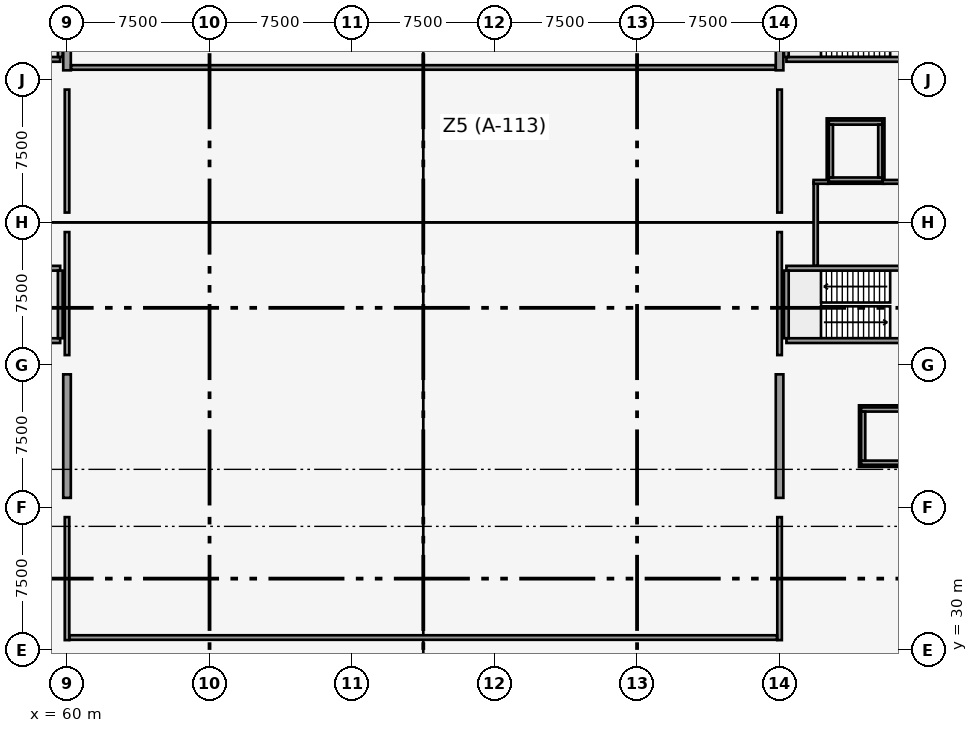
"""IFC4 building model, lengths in metres.
Left out: names, types, materials, properties, quantities, classifications, styles, units other than length and angle.
Written with IfcOpenShell. Run it as: python <this file> out.ifc"""

import sys

from ifc_helpers import new_model, si_unit, direction, frame, frame_2d, origin, origin_2d, place, context, subcontext, project, spatial, rectangle, extrude, element, fill, save


model = new_model("IFC4")
c1 = context("Model", 3, precision=1e-05, world=origin(), true_north=direction((0.0, 1.0)))
c2 = subcontext(c1, "Body", "Model", "MODEL_VIEW")
j1 = project(units=[si_unit("LENGTHUNIT", "METRE"), si_unit("PLANEANGLEUNIT", "RADIAN")], contexts=[c1])
p1 = place(None, origin())
s1 = spatial("IfcSite", under=j1, at=p1, CompositionType="ELEMENT")
p2 = place(p1, origin())
s2 = spatial("IfcBuilding", under=s1, at=p2, CompositionType="ELEMENT")
p3 = place(p2, frame((0.0, 0.0, -4.8)))
s3 = spatial("IfcBuildingStorey", under=s2, at=p3, CompositionType="ELEMENT", Elevation=-4.8)
for number, where, z_axis, x_axis in (
    (1, (60.0, 30.0, 0.0), (0.0, 0.0, 1.0), (1.0, 0.0, 0.0)),
    (2, (60.0, 37.5, 0.0), (0.0, 0.0, 1.0), (1.0, 0.0, 0.0)),
    (3, (60.0, 45.0, 0.0), (0.0, 0.0, 1.0), (1.0, 0.0, 0.0)),
    (4, (60.0, 52.5, 0.0), (0.0, 0.0, 1.0), (1.0, 0.0, 0.0)),
    (5, (60.0, 60.0, 0.0), (0.0, 0.0, 1.0), (1.0, 0.0, 0.0)),
):
    element("IfcColumn", number, at=place(p3, frame(where, z_axis=z_axis, x_axis=x_axis)), inside=s3, PredefinedType="COLUMN", context=c2, shape_type="SweptSolid", body=[
        extrude(rectangle(XDim=1.0, YDim=1.0, at=origin_2d()), origin(), (0.0, 0.0, 1.0), 4.8),
    ])
for number, where, z_axis, x_axis in (
    (6, (67.5, 30.0, 0.0), (0.0, 0.0, 1.0), (1.0, 0.0, 0.0)),
    (7, (75.0, 30.0, 0.0), (0.0, 0.0, 1.0), (1.0, 0.0, 0.0)),
    (8, (75.0, 37.5, 0.0), (0.0, 0.0, 1.0), (1.0, 0.0, 0.0)),
    (9, (75.0, 45.0, 0.0), (0.0, 0.0, 1.0), (1.0, 0.0, 0.0)),
    (10, (75.0, 52.5, 0.0), (0.0, 0.0, 1.0), (1.0, 0.0, 0.0)),
    (11, (75.0, 60.0, 0.0), (0.0, 0.0, 1.0), (1.0, 0.0, 0.0)),
    (12, (82.5, 30.0, 0.0), (0.0, 0.0, 1.0), (1.0, 0.0, 0.0)),
    (13, (90.0, 30.0, 0.0), (0.0, 0.0, 1.0), (1.0, 0.0, 0.0)),
    (14, (90.0, 37.5, 0.0), (0.0, 0.0, 1.0), (1.0, 0.0, 0.0)),
    (15, (90.0, 45.0, 0.0), (0.0, 0.0, 1.0), (1.0, 0.0, 0.0)),
    (16, (90.0, 52.5, 0.0), (0.0, 0.0, 1.0), (1.0, 0.0, 0.0)),
    (17, (90.0, 60.0, 0.0), (0.0, 0.0, 1.0), (1.0, 0.0, 0.0)),
):
    element("IfcColumn", number, at=place(p3, frame(where, z_axis=z_axis, x_axis=x_axis)), inside=s3, PredefinedType="COLUMN", context=c2, shape_type="SweptSolid", body=[
        extrude(rectangle(XDim=0.9, YDim=0.9, at=origin_2d()), origin(), (0.0, 0.0, 1.0), 4.8),
    ])
for number, where, z_axis, x_axis in (
    (18, (97.5, 30.0, 0.0), (0.0, 0.0, 1.0), (1.0, 0.0, 0.0)),
    (19, (97.5, 37.5, 0.0), (0.0, 0.0, 1.0), (1.0, 0.0, 0.0)),
    (20, (97.5, 45.0, 0.0), (0.0, 0.0, 1.0), (1.0, 0.0, 0.0)),
    (21, (97.5, 52.5, 0.0), (0.0, 0.0, 1.0), (1.0, 0.0, 0.0)),
    (22, (97.5, 60.0, 0.0), (0.0, 0.0, 1.0), (1.0, 0.0, 0.0)),
):
    element("IfcColumn", number, at=place(p3, frame(where, z_axis=z_axis, x_axis=x_axis)), inside=s3, PredefinedType="COLUMN", context=c2, shape_type="SweptSolid", body=[
        extrude(rectangle(XDim=1.0, YDim=1.0, at=origin_2d()), origin(), (0.0, 0.0, 1.0), 4.8),
    ])
for number, where, z_axis, x_axis in (
    (23, (60.0, 38.0, 0.0), (0.0, 0.0, 1.0), (0.0, 1.0, 0.0)),
    (24, (60.0, 60.5, 0.0), (0.0, 0.0, 1.0), (0.0, 1.0, 0.0)),
):
    element("IfcWall", number, at=place(p3, frame(where, z_axis=z_axis, x_axis=x_axis)), inside=s3, PredefinedType="SHEAR", context=c2, shape_type="SweptSolid", body=[
        extrude(rectangle(XDim=6.5, YDim=0.4, at=frame_2d((3.25, 0.0))), origin(), (0.0, 0.0, 1.0), 2.7),
    ])
for number, where, z_axis, x_axis in (
    (25, (97.5, 38.0, 0.0), (0.0, 0.0, 1.0), (0.0, 1.0, 0.0)),
    (26, (97.5, 60.5, 0.0), (0.0, 0.0, 1.0), (0.0, 1.0, 0.0)),
):
    element("IfcWall", number, at=place(p3, frame(where, z_axis=z_axis, x_axis=x_axis)), inside=s3, PredefinedType="SHEAR", context=c2, shape_type="SweptSolid", body=[
        extrude(rectangle(XDim=6.5, YDim=0.4, at=frame_2d((3.25, 0.0))), origin(), (0.0, 0.0, 1.0), 3.55),
    ])
p4 = place(p3, frame((52.38, 46.275, 0.0), z_axis=(0.0, 0.0, 1.0), x_axis=(1.0, 0.0, 0.0)))
e27 = element("IfcWall", 27, at=p4, inside=s3, PredefinedType="SOLIDWALL", context=c2, shape_type="SweptSolid", body=[
    extrude(rectangle(XDim=7.26, YDim=0.25, at=frame_2d((3.63, 0.0))), origin(), (0.0, 0.0, 1.0), 4.5),
])
p5 = place(p4, frame((0.62, 0.0, 0.0)))
e28 = element("IfcOpeningElement", 28, at=p5, cuts=e27, PredefinedType="OPENING", context=c2, shape_type="SweptSolid", body=[
    extrude(rectangle(XDim=1.1, YDim=2.15, at=frame_2d((0.55, 1.075))), frame((0.0, 0.135, 0.0), z_axis=(0.0, -1.0, 0.0), x_axis=(1.0, 0.0, 0.0)), (0.0, 0.0, 1.0), 0.27),
])
p6 = place(p3, frame((52.38, 50.085, 0.0), z_axis=(0.0, 0.0, 1.0), x_axis=(1.0, 0.0, 0.0)))
e29 = element("IfcWall", 29, at=p6, inside=s3, PredefinedType="SOLIDWALL", context=c2, shape_type="SweptSolid", body=[
    extrude(rectangle(XDim=7.26, YDim=0.25, at=frame_2d((3.63, 0.0))), origin(), (0.0, 0.0, 1.0), 4.5),
])
p7 = place(p6, frame((0.62, 0.0, 0.0)))
e30 = element("IfcOpeningElement", 30, at=p7, cuts=e29, PredefinedType="OPENING", context=c2, shape_type="SweptSolid", body=[
    extrude(rectangle(XDim=1.1, YDim=2.15, at=frame_2d((0.55, 1.075))), frame((0.0, 0.135, 0.0), z_axis=(0.0, -1.0, 0.0), x_axis=(1.0, 0.0, 0.0)), (0.0, 0.0, 1.0), 0.27),
])
p8 = place(p3, frame((59.645, 46.4, 0.0), z_axis=(0.0, 0.0, 1.0), x_axis=(0.0, 1.0, 0.0)))
e31 = element("IfcWall", 31, at=p8, inside=s3, PredefinedType="SOLIDWALL", context=c2, shape_type="SweptSolid", body=[
    extrude(rectangle(XDim=3.56, YDim=0.25, at=frame_2d((1.78, 0.0))), origin(), (0.0, 0.0, 1.0), 4.5),
])
p9 = place(p3, frame((97.86, 46.275, 0.0), z_axis=(0.0, 0.0, 1.0), x_axis=(1.0, 0.0, 0.0)))
e32 = element("IfcWall", 32, at=p9, inside=s3, PredefinedType="SOLIDWALL", context=c2, shape_type="SweptSolid", body=[
    extrude(rectangle(XDim=7.26, YDim=0.25, at=frame_2d((3.63, 0.0))), origin(), (0.0, 0.0, 1.0), 4.5),
])
p10 = place(p9, frame((5.54, 0.0, 0.0)))
e33 = element("IfcOpeningElement", 33, at=p10, cuts=e32, PredefinedType="OPENING", context=c2, shape_type="SweptSolid", body=[
    extrude(rectangle(XDim=1.1, YDim=2.15, at=frame_2d((0.55, 1.075))), frame((0.0, 0.135, 0.0), z_axis=(0.0, -1.0, 0.0), x_axis=(1.0, 0.0, 0.0)), (0.0, 0.0, 1.0), 0.27),
])
p11 = place(p3, frame((97.86, 50.085, 0.0), z_axis=(0.0, 0.0, 1.0), x_axis=(1.0, 0.0, 0.0)))
e34 = element("IfcWall", 34, at=p11, inside=s3, PredefinedType="SOLIDWALL", context=c2, shape_type="SweptSolid", body=[
    extrude(rectangle(XDim=7.26, YDim=0.25, at=frame_2d((3.63, 0.0))), origin(), (0.0, 0.0, 1.0), 4.5),
])
p12 = place(p11, frame((5.54, 0.0, 0.0)))
e35 = element("IfcOpeningElement", 35, at=p12, cuts=e34, PredefinedType="OPENING", context=c2, shape_type="SweptSolid", body=[
    extrude(rectangle(XDim=1.1, YDim=2.15, at=frame_2d((0.55, 1.075))), frame((0.0, 0.135, 0.0), z_axis=(0.0, -1.0, 0.0), x_axis=(1.0, 0.0, 0.0)), (0.0, 0.0, 1.0), 0.27),
])
p13 = place(p3, frame((97.855, 46.4, 0.0), z_axis=(0.0, 0.0, 1.0), x_axis=(0.0, 1.0, 0.0)))
e36 = element("IfcWall", 36, at=p13, inside=s3, PredefinedType="SOLIDWALL", context=c2, shape_type="SweptSolid", body=[
    extrude(rectangle(XDim=3.56, YDim=0.25, at=frame_2d((1.78, 0.0))), origin(), (0.0, 0.0, 1.0), 4.5),
])
p14 = place(p3, frame((52.38, 61.075, 0.0), z_axis=(0.0, 0.0, 1.0), x_axis=(1.0, 0.0, 0.0)))
e37 = element("IfcWall", 37, at=p14, inside=s3, PredefinedType="SOLIDWALL", context=c2, shape_type="SweptSolid", body=[
    extrude(rectangle(XDim=7.26, YDim=0.25, at=frame_2d((3.63, 0.0))), origin(), (0.0, 0.0, 1.0), 4.5),
])
p15 = place(p14, frame((0.62, 0.0, 0.0)))
e38 = element("IfcOpeningElement", 38, at=p15, cuts=e37, PredefinedType="OPENING", context=c2, shape_type="SweptSolid", body=[
    extrude(rectangle(XDim=1.1, YDim=2.15, at=frame_2d((0.55, 1.075))), frame((0.0, 0.135, 0.0), z_axis=(0.0, -1.0, 0.0), x_axis=(1.0, 0.0, 0.0)), (0.0, 0.0, 1.0), 0.27),
])
p16 = place(p3, frame((59.645, 61.2, 0.0), z_axis=(0.0, 0.0, 1.0), x_axis=(0.0, 1.0, 0.0)))
e39 = element("IfcWall", 39, at=p16, inside=s3, PredefinedType="SOLIDWALL", context=c2, shape_type="SweptSolid", body=[
    extrude(rectangle(XDim=3.56, YDim=0.25, at=frame_2d((1.78, 0.0))), origin(), (0.0, 0.0, 1.0), 4.5),
])
p17 = place(p3, frame((97.86, 61.075, 0.0), z_axis=(0.0, 0.0, 1.0), x_axis=(1.0, 0.0, 0.0)))
e40 = element("IfcWall", 40, at=p17, inside=s3, PredefinedType="SOLIDWALL", context=c2, shape_type="SweptSolid", body=[
    extrude(rectangle(XDim=7.26, YDim=0.25, at=frame_2d((3.63, 0.0))), origin(), (0.0, 0.0, 1.0), 4.5),
])
p18 = place(p17, frame((5.54, 0.0, 0.0)))
e41 = element("IfcOpeningElement", 41, at=p18, cuts=e40, PredefinedType="OPENING", context=c2, shape_type="SweptSolid", body=[
    extrude(rectangle(XDim=1.1, YDim=2.15, at=frame_2d((0.55, 1.075))), frame((0.0, 0.135, 0.0), z_axis=(0.0, -1.0, 0.0), x_axis=(1.0, 0.0, 0.0)), (0.0, 0.0, 1.0), 0.27),
])
p19 = place(p3, frame((97.855, 61.2, 0.0), z_axis=(0.0, 0.0, 1.0), x_axis=(0.0, 1.0, 0.0)))
e42 = element("IfcWall", 42, at=p19, inside=s3, PredefinedType="SOLIDWALL", context=c2, shape_type="SweptSolid", body=[
    extrude(rectangle(XDim=3.56, YDim=0.25, at=frame_2d((1.78, 0.0))), origin(), (0.0, 0.0, 1.0), 4.5),
])
for number, where, z_axis, x_axis in (
    (43, (101.79, 39.85, 0.0), (0.0, 0.0, 1.0), (1.0, 0.0, 0.0)),
    (44, (101.79, 42.65, 0.0), (0.0, 0.0, 1.0), (1.0, 0.0, 0.0)),
):
    element("IfcWall", number, at=place(p3, frame(where, z_axis=z_axis, x_axis=x_axis)), inside=s3, PredefinedType="SOLIDWALL", context=c2, shape_type="SweptSolid", body=[
        extrude(rectangle(XDim=2.62, YDim=0.22, at=frame_2d((1.31, 0.0))), origin(), (0.0, 0.0, 1.0), 4.5),
    ])
p20 = place(p3, frame((101.9, 39.96, 0.0), z_axis=(0.0, 0.0, 1.0), x_axis=(0.0, 1.0, 0.0)))
e45 = element("IfcWall", 45, at=p20, inside=s3, PredefinedType="SOLIDWALL", context=c2, shape_type="SweptSolid", body=[
    extrude(rectangle(XDim=2.58, YDim=0.22, at=frame_2d((1.29, 0.0))), origin(), (0.0, 0.0, 1.0), 4.5),
])
p21 = place(p20, frame((0.79, 0.0, 0.0)))
e46 = element("IfcOpeningElement", 46, at=p21, cuts=e45, PredefinedType="OPENING", context=c2, shape_type="SweptSolid", body=[
    extrude(rectangle(XDim=1.0, YDim=2.15, at=frame_2d((0.5, 1.075))), frame((0.0, 0.12, 0.0), z_axis=(0.0, -1.0, 0.0), x_axis=(1.0, 0.0, 0.0)), (0.0, 0.0, 1.0), 0.24),
])
p22 = place(p3, frame((100.09, 54.75, 0.0), z_axis=(0.0, 0.0, 1.0), x_axis=(1.0, 0.0, 0.0)))
e47 = element("IfcWall", 47, at=p22, inside=s3, PredefinedType="SOLIDWALL", context=c2, shape_type="SweptSolid", body=[
    extrude(rectangle(XDim=2.82, YDim=0.22, at=frame_2d((1.41, 0.0))), origin(), (0.0, 0.0, 1.0), 4.5),
])
p23 = place(p22, frame((0.86, 0.0, 0.0)))
e48 = element("IfcOpeningElement", 48, at=p23, cuts=e47, PredefinedType="OPENING", context=c2, shape_type="SweptSolid", body=[
    extrude(rectangle(XDim=1.1, YDim=2.15, at=frame_2d((0.55, 1.075))), frame((0.0, 0.12, 0.0), z_axis=(0.0, -1.0, 0.0), x_axis=(1.0, 0.0, 0.0)), (0.0, 0.0, 1.0), 0.24),
])
p24 = place(p3, frame((100.09, 57.75, 0.0), z_axis=(0.0, 0.0, 1.0), x_axis=(1.0, 0.0, 0.0)))
e49 = element("IfcWall", 49, at=p24, inside=s3, PredefinedType="SOLIDWALL", context=c2, shape_type="SweptSolid", body=[
    extrude(rectangle(XDim=2.82, YDim=0.22, at=frame_2d((1.41, 0.0))), origin(), (0.0, 0.0, 1.0), 4.5),
])
for number, where, z_axis, x_axis in (
    (50, (100.2, 54.86, 0.0), (0.0, 0.0, 1.0), (0.0, 1.0, 0.0)),
    (51, (102.8, 54.86, 0.0), (0.0, 0.0, 1.0), (0.0, 1.0, 0.0)),
):
    element("IfcWall", number, at=place(p3, frame(where, z_axis=z_axis, x_axis=x_axis)), inside=s3, PredefinedType="SOLIDWALL", context=c2, shape_type="SweptSolid", body=[
        extrude(rectangle(XDim=2.78, YDim=0.22, at=frame_2d((1.39, 0.0))), origin(), (0.0, 0.0, 1.0), 4.5),
    ])
p25 = place(p3, frame((99.4, 50.22, 0.0), z_axis=(0.0, 0.0, 1.0), x_axis=(0.0, 1.0, 0.0)))
e52 = element("IfcWall", 52, at=p25, inside=s3, PredefinedType="SOLIDWALL", context=c2, shape_type="SweptSolid", body=[
    extrude(rectangle(XDim=4.41, YDim=0.22, at=frame_2d((2.205, 0.0))), origin(), (0.0, 0.0, 1.0), 4.5),
])
p26 = place(p25, frame((0.45, 0.0, 0.0)))
e53 = element("IfcOpeningElement", 53, at=p26, cuts=e52, PredefinedType="OPENING", context=c2, shape_type="SweptSolid", body=[
    extrude(rectangle(XDim=1.1, YDim=2.15, at=frame_2d((0.55, 1.075))), frame((0.0, 0.12, 0.0), z_axis=(0.0, -1.0, 0.0), x_axis=(1.0, 0.0, 0.0)), (0.0, 0.0, 1.0), 0.24),
])
p27 = place(p3, frame((99.29, 54.63, 0.0), z_axis=(0.0, 0.0, 1.0), x_axis=(1.0, 0.0, 0.0)))
e54 = element("IfcWall", 54, at=p27, inside=s3, PredefinedType="PARTITIONING", context=c2, shape_type="SweptSolid", body=[
    extrude(rectangle(XDim=0.785, YDim=0.2, at=frame_2d((0.393, 0.0))), origin(), (0.0, 0.0, 1.0), 4.48),
])
p28 = place(p3, frame((102.925, 54.63, 0.0), z_axis=(0.0, 0.0, 1.0), x_axis=(1.0, 0.0, 0.0)))
e55 = element("IfcWall", 55, at=p28, inside=s3, PredefinedType="PARTITIONING", context=c2, shape_type="SweptSolid", body=[
    extrude(rectangle(XDim=1.935, YDim=0.2, at=frame_2d((0.968, 0.0))), origin(), (0.0, 0.0, 1.0), 4.48),
])
p29 = place(p3, frame((60.0, 30.514, 0.0), z_axis=(0.0, 0.0, 1.0), x_axis=(0.0, 1.0, 0.0)))
e56 = element("IfcWall", 56, at=p29, inside=s3, PredefinedType="PARTITIONING", context=c2, shape_type="SweptSolid", body=[
    extrude(rectangle(XDim=6.472, YDim=0.24, at=frame_2d((3.236, 0.0))), origin(), (0.0, 0.0, 1.0), 2.67),
])
p30 = place(p29, frame((2.436, 0.0, 0.0)))
e57 = element("IfcOpeningElement", 57, at=p30, cuts=e56, PredefinedType="OPENING", context=c2, shape_type="SweptSolid", body=[
    extrude(rectangle(XDim=1.6, YDim=2.15, at=frame_2d((0.8, 1.075))), frame((0.0, 0.13, 0.0), z_axis=(0.0, -1.0, 0.0), x_axis=(1.0, 0.0, 0.0)), (0.0, 0.0, 1.0), 0.26),
])
p31 = place(p3, frame((60.0, 45.514, 0.0), z_axis=(0.0, 0.0, 1.0), x_axis=(0.0, 1.0, 0.0)))
e58 = element("IfcWall", 58, at=p31, inside=s3, PredefinedType="PARTITIONING", context=c2, shape_type="SweptSolid", body=[
    extrude(rectangle(XDim=6.472, YDim=0.24, at=frame_2d((3.236, 0.0))), origin(), (0.0, 0.0, 1.0), 2.67),
])
p32 = place(p3, frame((60.0, 53.014, 0.0), z_axis=(0.0, 0.0, 1.0), x_axis=(0.0, 1.0, 0.0)))
e59 = element("IfcWall", 59, at=p32, inside=s3, PredefinedType="PARTITIONING", context=c2, shape_type="SweptSolid", body=[
    extrude(rectangle(XDim=6.472, YDim=0.24, at=frame_2d((3.236, 0.0))), origin(), (0.0, 0.0, 1.0), 2.67),
])
p33 = place(p32, frame((2.436, 0.0, 0.0)))
e60 = element("IfcOpeningElement", 60, at=p33, cuts=e59, PredefinedType="OPENING", context=c2, shape_type="SweptSolid", body=[
    extrude(rectangle(XDim=1.6, YDim=2.15, at=frame_2d((0.8, 1.075))), frame((0.0, 0.13, 0.0), z_axis=(0.0, -1.0, 0.0), x_axis=(1.0, 0.0, 0.0)), (0.0, 0.0, 1.0), 0.26),
])
p34 = place(p3, frame((97.5, 30.514, 0.0), z_axis=(0.0, 0.0, 1.0), x_axis=(0.0, 1.0, 0.0)))
e61 = element("IfcWall", 61, at=p34, inside=s3, PredefinedType="PARTITIONING", context=c2, shape_type="SweptSolid", body=[
    extrude(rectangle(XDim=6.472, YDim=0.24, at=frame_2d((3.236, 0.0))), origin(), (0.0, 0.0, 1.0), 3.52),
])
p35 = place(p34, frame((2.436, 0.0, 0.0)))
e62 = element("IfcOpeningElement", 62, at=p35, cuts=e61, PredefinedType="OPENING", context=c2, shape_type="SweptSolid", body=[
    extrude(rectangle(XDim=1.6, YDim=2.15, at=frame_2d((0.8, 1.075))), frame((0.0, 0.13, 0.0), z_axis=(0.0, -1.0, 0.0), x_axis=(1.0, 0.0, 0.0)), (0.0, 0.0, 1.0), 0.26),
])
p36 = place(p3, frame((97.5, 45.514, 0.0), z_axis=(0.0, 0.0, 1.0), x_axis=(0.0, 1.0, 0.0)))
e63 = element("IfcWall", 63, at=p36, inside=s3, PredefinedType="PARTITIONING", context=c2, shape_type="SweptSolid", body=[
    extrude(rectangle(XDim=6.472, YDim=0.24, at=frame_2d((3.236, 0.0))), origin(), (0.0, 0.0, 1.0), 3.52),
])
p37 = place(p3, frame((97.5, 53.014, 0.0), z_axis=(0.0, 0.0, 1.0), x_axis=(0.0, 1.0, 0.0)))
e64 = element("IfcWall", 64, at=p37, inside=s3, PredefinedType="PARTITIONING", context=c2, shape_type="SweptSolid", body=[
    extrude(rectangle(XDim=6.472, YDim=0.24, at=frame_2d((3.236, 0.0))), origin(), (0.0, 0.0, 1.0), 3.52),
])
p38 = place(p37, frame((2.436, 0.0, 0.0)))
e65 = element("IfcOpeningElement", 65, at=p38, cuts=e64, PredefinedType="OPENING", context=c2, shape_type="SweptSolid", body=[
    extrude(rectangle(XDim=1.6, YDim=2.15, at=frame_2d((0.8, 1.075))), frame((0.0, 0.13, 0.0), z_axis=(0.0, -1.0, 0.0), x_axis=(1.0, 0.0, 0.0)), (0.0, 0.0, 1.0), 0.26),
])
p39 = place(p3, frame((60.134, 30.65, 0.0), z_axis=(0.0, 0.0, 1.0), x_axis=(1.0, 0.0, 0.0)))
e66 = element("IfcWall", 66, at=p39, inside=s3, PredefinedType="PARTITIONING", context=c2, shape_type="SweptSolid", body=[
    extrude(rectangle(XDim=37.232, YDim=0.24, at=frame_2d((18.616, 0.0))), origin(), (0.0, 0.0, 1.0), 3.42),
])
p40 = place(p3, frame((60.214, 60.65, 0.0), z_axis=(0.0, 0.0, 1.0), x_axis=(1.0, 0.0, 0.0)))
e67 = element("IfcWall", 67, at=p40, inside=s3, PredefinedType="PARTITIONING", context=c2, shape_type="SweptSolid", body=[
    extrude(rectangle(XDim=37.072, YDim=0.24, at=frame_2d((18.536, 0.0))), origin(), (0.0, 0.0, 1.0), 2.67),
])
p41 = place(p10, origin())
e68 = element("IfcDoor", 68, at=p41, inside=s3, OperationType="SINGLE_SWING_LEFT", PredefinedType="DOOR", context=c2, shape_type="SweptSolid", body=[
    extrude(rectangle(XDim=1.1, YDim=2.15, at=frame_2d((0.55, 1.075))), frame((0.0, 0.025, 0.0), z_axis=(0.0, -1.0, 0.0), x_axis=(1.0, 0.0, 0.0)), (0.0, 0.0, 1.0), 0.05),
])
fill(e33, e68)
p42 = place(p12, frame((1.1, 0.0, 0.0), z_axis=(0.0, 0.0, 1.0), x_axis=(-1.0, 0.0, 0.0)))
e69 = element("IfcDoor", 69, at=p42, inside=s3, OperationType="SINGLE_SWING_RIGHT", PredefinedType="DOOR", context=c2, shape_type="SweptSolid", body=[
    extrude(rectangle(XDim=1.1, YDim=2.15, at=frame_2d((0.55, 1.075))), frame((0.0, 0.025, 0.0), z_axis=(0.0, -1.0, 0.0), x_axis=(1.0, 0.0, 0.0)), (0.0, 0.0, 1.0), 0.05),
])
fill(e35, e69)
p43 = place(p18, origin())
e70 = element("IfcDoor", 70, at=p43, inside=s3, OperationType="SINGLE_SWING_LEFT", PredefinedType="DOOR", context=c2, shape_type="SweptSolid", body=[
    extrude(rectangle(XDim=1.1, YDim=2.15, at=frame_2d((0.55, 1.075))), frame((0.0, 0.025, 0.0), z_axis=(0.0, -1.0, 0.0), x_axis=(1.0, 0.0, 0.0)), (0.0, 0.0, 1.0), 0.05),
])
fill(e41, e70)
p44 = place(p21, origin())
e71 = element("IfcDoor", 71, at=p44, inside=s3, OperationType="SLIDING_TO_LEFT", PredefinedType="DOOR", context=c2, shape_type="SweptSolid", body=[
    extrude(rectangle(XDim=1.0, YDim=2.15, at=frame_2d((0.5, 1.075))), frame((0.0, 0.025, 0.0), z_axis=(0.0, -1.0, 0.0), x_axis=(1.0, 0.0, 0.0)), (0.0, 0.0, 1.0), 0.05),
])
fill(e46, e71)
p45 = place(p23, origin())
e72 = element("IfcDoor", 72, at=p45, inside=s3, OperationType="SLIDING_TO_LEFT", PredefinedType="DOOR", context=c2, shape_type="SweptSolid", body=[
    extrude(rectangle(XDim=1.1, YDim=2.15, at=frame_2d((0.55, 1.075))), frame((0.0, 0.025, 0.0), z_axis=(0.0, -1.0, 0.0), x_axis=(1.0, 0.0, 0.0)), (0.0, 0.0, 1.0), 0.05),
])
fill(e48, e72)
p46 = place(p26, origin())
e73 = element("IfcDoor", 73, at=p46, inside=s3, OperationType="SINGLE_SWING_RIGHT", PredefinedType="DOOR", context=c2, shape_type="SweptSolid", body=[
    extrude(rectangle(XDim=1.1, YDim=2.15, at=frame_2d((0.55, 1.075))), frame((0.0, 0.025, 0.0), z_axis=(0.0, -1.0, 0.0), x_axis=(1.0, 0.0, 0.0)), (0.0, 0.0, 1.0), 0.05),
])
fill(e53, e73)
p47 = place(p30, origin())
e74 = element("IfcDoor", 74, at=p47, inside=s3, OperationType="SINGLE_SWING_LEFT", PredefinedType="DOOR", context=c2, shape_type="SweptSolid", body=[
    extrude(rectangle(XDim=1.6, YDim=2.15, at=frame_2d((0.8, 1.075))), frame((0.0, 0.025, 0.0), z_axis=(0.0, -1.0, 0.0), x_axis=(1.0, 0.0, 0.0)), (0.0, 0.0, 1.0), 0.05),
])
fill(e57, e74)
p48 = place(p33, origin())
e75 = element("IfcDoor", 75, at=p48, inside=s3, OperationType="SINGLE_SWING_RIGHT", PredefinedType="DOOR", context=c2, shape_type="SweptSolid", body=[
    extrude(rectangle(XDim=1.6, YDim=2.15, at=frame_2d((0.8, 1.075))), frame((0.0, 0.025, 0.0), z_axis=(0.0, -1.0, 0.0), x_axis=(1.0, 0.0, 0.0)), (0.0, 0.0, 1.0), 0.05),
])
fill(e60, e75)
p49 = place(p35, origin())
e76 = element("IfcDoor", 76, at=p49, inside=s3, OperationType="SINGLE_SWING_LEFT", PredefinedType="DOOR", context=c2, shape_type="SweptSolid", body=[
    extrude(rectangle(XDim=1.6, YDim=2.15, at=frame_2d((0.8, 1.075))), frame((0.0, 0.025, 0.0), z_axis=(0.0, -1.0, 0.0), x_axis=(1.0, 0.0, 0.0)), (0.0, 0.0, 1.0), 0.05),
])
fill(e62, e76)
p50 = place(p38, origin())
e77 = element("IfcDoor", 77, at=p50, inside=s3, OperationType="SINGLE_SWING_RIGHT", PredefinedType="DOOR", context=c2, shape_type="SweptSolid", body=[
    extrude(rectangle(XDim=1.6, YDim=2.15, at=frame_2d((0.8, 1.075))), frame((0.0, 0.025, 0.0), z_axis=(0.0, -1.0, 0.0), x_axis=(1.0, 0.0, 0.0)), (0.0, 0.0, 1.0), 0.05),
])
fill(e65, e77)
save(model, sys.argv[1])
